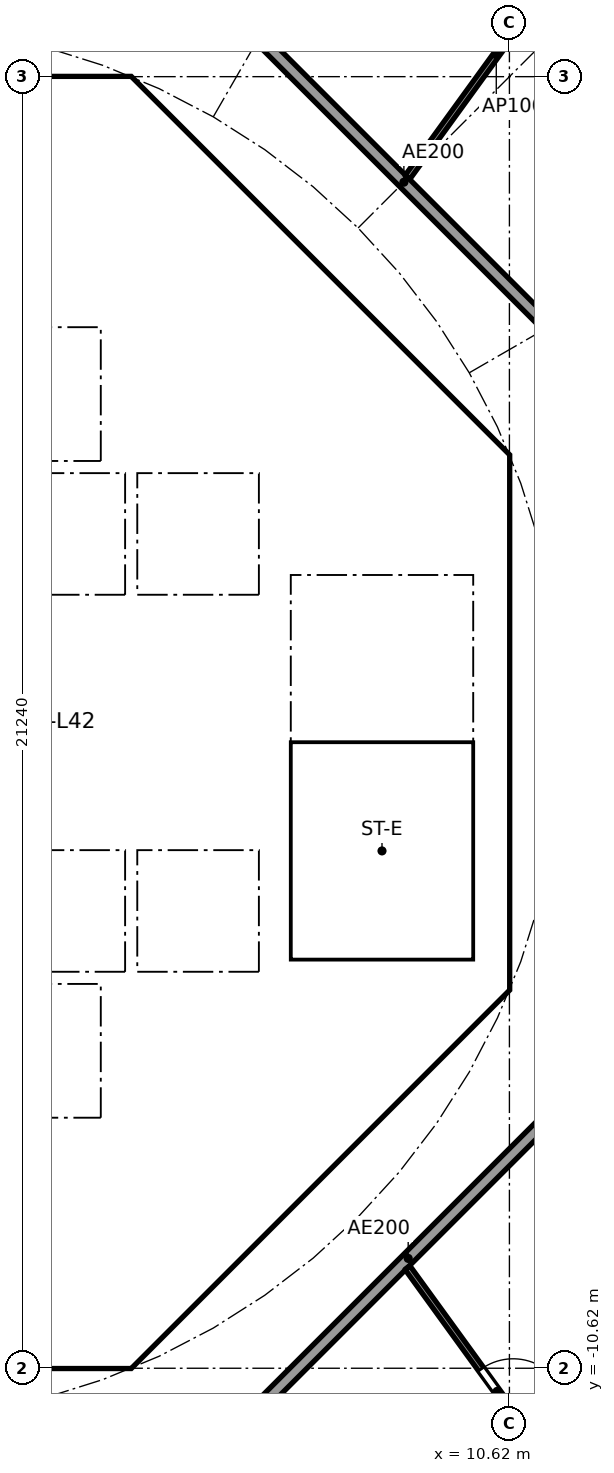
"""IFC4 building model, lengths in metres.
Left out: names, types, materials, properties, quantities, classifications, styles, units other than length and angle.
Written with IfcOpenShell. Run it as: python <this file> out.ifc"""

import sys

from ifc_helpers import new_model, si_unit, direction, frame, frame_2d, origin, place, context, subcontext, project, spatial, polyline, rectangle, outline, extrude, element, fill, save


model = new_model("IFC4")
c1 = context("Model", 3, precision=1e-05, world=origin(), true_north=direction((0.0, 1.0)))
c2 = subcontext(c1, "Body", "Model", "MODEL_VIEW")
j1 = project(units=[si_unit("LENGTHUNIT", "METRE"), si_unit("PLANEANGLEUNIT", "RADIAN")], contexts=[c1])
p1 = place(None, origin())
s1 = spatial("IfcSite", under=j1, at=p1, CompositionType="ELEMENT")
p2 = place(p1, origin())
s2 = spatial("IfcBuilding", under=s1, at=p2, CompositionType="ELEMENT")
p3 = place(p2, frame((0.0, 0.0, 169.6)))
s3 = spatial("IfcBuildingStorey", under=s2, at=p3, CompositionType="ELEMENT", Elevation=169.6)
p4 = place(p3, frame((9.988, 4.613, 0.0), z_axis=(0.0, 0.0, 1.0), x_axis=(-0.707106781187, 0.707106781187, 0.0)))
e1 = element("IfcWall", 1, at=p4, inside=s3, PredefinedType="SHEAR", context=c2, shape_type="SweptSolid", body=[
    extrude(rectangle(XDim=7.602, YDim=0.6, at=frame_2d((3.801, 0.0))), origin(), (0.0, 0.0, 1.0), 3.44),
])
p5 = place(p4, frame((3.201, 0.0, 0.0)))
e2 = element("IfcOpeningElement", 2, at=p5, cuts=e1, PredefinedType="OPENING", context=c2, shape_type="SweptSolid", body=[
    extrude(rectangle(XDim=1.2, YDim=2.1, at=frame_2d((0.6, 1.05))), frame((0.0, 0.31, 0.0), z_axis=(0.0, -1.0, 0.0), x_axis=(1.0, 0.0, 0.0)), (0.0, 0.0, 1.0), 0.62),
])
p6 = place(p3, frame((4.613, -9.988, 0.0), z_axis=(0.0, 0.0, 1.0), x_axis=(0.707106781187, 0.707106781187, 0.0)))
e3 = element("IfcWall", 3, at=p6, inside=s3, PredefinedType="SHEAR", context=c2, shape_type="SweptSolid", body=[
    extrude(rectangle(XDim=7.602, YDim=0.6, at=frame_2d((3.801, 0.0))), origin(), (0.0, 0.0, 1.0), 3.44),
])
p7 = place(p6, frame((3.201, 0.0, 0.0)))
e4 = element("IfcOpeningElement", 4, at=p7, cuts=e3, PredefinedType="OPENING", context=c2, shape_type="SweptSolid", body=[
    extrude(rectangle(XDim=1.2, YDim=2.1, at=frame_2d((0.6, 1.05))), frame((0.0, 0.31, 0.0), z_axis=(0.0, -1.0, 0.0), x_axis=(1.0, 0.0, 0.0)), (0.0, 0.0, 1.0), 0.62),
])
p8 = place(p3, frame((4.0, 4.3, 0.0), z_axis=(0.0, 0.0, 1.0), x_axis=(0.0, 1.0, 0.0)))
e5 = element("IfcWall", 5, at=p8, inside=s3, PredefinedType="SOLIDWALL", context=c2, shape_type="SweptSolid", body=[
    extrude(rectangle(XDim=2.2, YDim=0.2, at=frame_2d((1.1, 0.0))), origin(), (0.0, 0.0, 1.0), 3.44),
])
p9 = place(p8, frame((0.55, 0.0, 0.0)))
e6 = element("IfcOpeningElement", 6, at=p9, cuts=e5, PredefinedType="OPENING", context=c2, shape_type="SweptSolid", body=[
    extrude(rectangle(XDim=1.1, YDim=2.1, at=frame_2d((0.55, 1.05))), frame((0.0, 0.11, 0.0), z_axis=(0.0, -1.0, 0.0), x_axis=(1.0, 0.0, 0.0)), (0.0, 0.0, 1.0), 0.22),
])
p10 = place(p3, frame((-6.7, 2.0, 0.0), z_axis=(0.0, 0.0, 1.0), x_axis=(1.0, 0.0, 0.0)))
e7 = element("IfcWall", 7, at=p10, inside=s3, PredefinedType="SOLIDWALL", context=c2, shape_type="SweptSolid", body=[
    extrude(rectangle(XDim=13.4, YDim=0.2, at=frame_2d((6.7, 0.0))), origin(), (0.0, 0.0, 1.0), 3.44),
])
p11 = place(p10, frame((7.25, 0.0, 0.0)))
e8 = element("IfcOpeningElement", 8, at=p11, cuts=e7, PredefinedType="OPENING", context=c2, shape_type="SweptSolid", body=[
    extrude(rectangle(XDim=1.1, YDim=2.1, at=frame_2d((0.55, 1.05))), frame((0.0, 0.11, 0.0), z_axis=(0.0, -1.0, 0.0), x_axis=(1.0, 0.0, 0.0)), (0.0, 0.0, 1.0), 0.22),
])
p12 = place(p10, frame((9.45, 0.0, 0.0)))
e9 = element("IfcOpeningElement", 9, at=p12, cuts=e7, PredefinedType="OPENING", context=c2, shape_type="SweptSolid", body=[
    extrude(rectangle(XDim=1.1, YDim=2.1, at=frame_2d((0.55, 1.05))), frame((0.0, 0.11, 0.0), z_axis=(0.0, -1.0, 0.0), x_axis=(1.0, 0.0, 0.0)), (0.0, 0.0, 1.0), 0.22),
])
p13 = place(p10, frame((2.95, 0.0, 0.0)))
e10 = element("IfcOpeningElement", 10, at=p13, cuts=e7, PredefinedType="OPENING", context=c2, shape_type="SweptSolid", body=[
    extrude(rectangle(XDim=0.9, YDim=2.1, at=frame_2d((0.45, 1.05))), frame((0.0, 0.11, 0.0), z_axis=(0.0, -1.0, 0.0), x_axis=(1.0, 0.0, 0.0)), (0.0, 0.0, 1.0), 0.22),
])
p14 = place(p3, frame((6.7, 4.0, 0.0), z_axis=(0.0, 0.0, 1.0), x_axis=(1.0, 0.0, 0.0)))
e11 = element("IfcWall", 11, at=p14, inside=s3, PredefinedType="SOLIDWALL", context=c2, shape_type="SweptSolid", body=[
    extrude(rectangle(XDim=3.325, YDim=0.2, at=frame_2d((1.662, 0.0))), origin(), (0.0, 0.0, 1.0), 3.44),
])
p15 = place(p14, frame((1.25, 0.0, 0.0)))
e12 = element("IfcOpeningElement", 12, at=p15, cuts=e11, PredefinedType="OPENING", context=c2, shape_type="SweptSolid", body=[
    extrude(rectangle(XDim=1.1, YDim=2.1, at=frame_2d((0.55, 1.05))), frame((0.0, 0.11, 0.0), z_axis=(0.0, -1.0, 0.0), x_axis=(1.0, 0.0, 0.0)), (0.0, 0.0, 1.0), 0.22),
])
p16 = place(p3, frame((4.0, 7.025, 0.0), z_axis=(0.0, 0.0, 1.0), x_axis=(0.0, 1.0, 0.0)))
e13 = element("IfcWall", 13, at=p16, inside=s3, PredefinedType="SOLIDWALL", context=c2, shape_type="SweptSolid", body=[
    extrude(rectangle(XDim=3.0, YDim=0.2, at=frame_2d((1.5, 0.0))), origin(), (0.0, 0.0, 1.0), 3.44),
])
p17 = place(p16, frame((0.925, 0.0, 0.0)))
e14 = element("IfcOpeningElement", 14, at=p17, cuts=e13, PredefinedType="OPENING", context=c2, shape_type="SweptSolid", body=[
    extrude(rectangle(XDim=1.1, YDim=2.1, at=frame_2d((0.55, 1.05))), frame((0.0, 0.11, 0.0), z_axis=(0.0, -1.0, 0.0), x_axis=(1.0, 0.0, 0.0)), (0.0, 0.0, 1.0), 0.22),
])
p18 = place(p3, frame((4.0, -10.025, 0.0), z_axis=(0.0, 0.0, 1.0), x_axis=(0.0, 1.0, 0.0)))
e15 = element("IfcWall", 15, at=p18, inside=s3, PredefinedType="SOLIDWALL", context=c2, shape_type="SweptSolid", body=[
    extrude(rectangle(XDim=3.0, YDim=0.2, at=frame_2d((1.5, 0.0))), origin(), (0.0, 0.0, 1.0), 3.44),
])
p19 = place(p18, frame((0.975, 0.0, 0.0)))
e16 = element("IfcOpeningElement", 16, at=p19, cuts=e15, PredefinedType="OPENING", context=c2, shape_type="SweptSolid", body=[
    extrude(rectangle(XDim=1.1, YDim=2.1, at=frame_2d((0.55, 1.05))), frame((0.0, 0.11, 0.0), z_axis=(0.0, -1.0, 0.0), x_axis=(1.0, 0.0, 0.0)), (0.0, 0.0, 1.0), 0.22),
])
p20 = place(p3, frame((4.0, -6.5, 0.0), z_axis=(0.0, 0.0, 1.0), x_axis=(0.0, 1.0, 0.0)))
e17 = element("IfcWall", 17, at=p20, inside=s3, PredefinedType="SOLIDWALL", context=c2, shape_type="SweptSolid", body=[
    extrude(rectangle(XDim=2.2, YDim=0.2, at=frame_2d((1.1, 0.0))), origin(), (0.0, 0.0, 1.0), 3.44),
])
p21 = place(p20, frame((0.55, 0.0, 0.0)))
e18 = element("IfcOpeningElement", 18, at=p21, cuts=e17, PredefinedType="OPENING", context=c2, shape_type="SweptSolid", body=[
    extrude(rectangle(XDim=1.1, YDim=2.1, at=frame_2d((0.55, 1.05))), frame((0.0, 0.11, 0.0), z_axis=(0.0, -1.0, 0.0), x_axis=(1.0, 0.0, 0.0)), (0.0, 0.0, 1.0), 0.22),
])
p22 = place(p3, frame((-6.7, -2.0, 0.0), z_axis=(0.0, 0.0, 1.0), x_axis=(1.0, 0.0, 0.0)))
e19 = element("IfcWall", 19, at=p22, inside=s3, PredefinedType="SOLIDWALL", context=c2, shape_type="SweptSolid", body=[
    extrude(rectangle(XDim=13.4, YDim=0.2, at=frame_2d((6.7, 0.0))), origin(), (0.0, 0.0, 1.0), 3.44),
])
p23 = place(p22, frame((5.05, 0.0, 0.0)))
e20 = element("IfcOpeningElement", 20, at=p23, cuts=e19, PredefinedType="OPENING", context=c2, shape_type="SweptSolid", body=[
    extrude(rectangle(XDim=1.1, YDim=2.1, at=frame_2d((0.55, 1.05))), frame((0.0, 0.11, 0.0), z_axis=(0.0, -1.0, 0.0), x_axis=(1.0, 0.0, 0.0)), (0.0, 0.0, 1.0), 0.22),
])
p24 = place(p22, frame((7.25, 0.0, 0.0)))
e21 = element("IfcOpeningElement", 21, at=p24, cuts=e19, PredefinedType="OPENING", context=c2, shape_type="SweptSolid", body=[
    extrude(rectangle(XDim=1.1, YDim=2.1, at=frame_2d((0.55, 1.05))), frame((0.0, 0.11, 0.0), z_axis=(0.0, -1.0, 0.0), x_axis=(1.0, 0.0, 0.0)), (0.0, 0.0, 1.0), 0.22),
])
p25 = place(p22, frame((1.85, 0.0, 0.0)))
e22 = element("IfcOpeningElement", 22, at=p25, cuts=e19, PredefinedType="OPENING", context=c2, shape_type="SweptSolid", body=[
    extrude(rectangle(XDim=0.9, YDim=2.1, at=frame_2d((0.45, 1.05))), frame((0.0, 0.11, 0.0), z_axis=(0.0, -1.0, 0.0), x_axis=(1.0, 0.0, 0.0)), (0.0, 0.0, 1.0), 0.22),
])
p26 = place(p3, origin())
e23 = element("IfcWall", 23, at=p26, inside=s3, PredefinedType="SHEAR", context=c2, shape_type="SweptSolid", body=[
    extrude(outline(polyline([(-4.152, -10.025), (4.152, -10.025), (4.401, -9.776), (4.825, -10.2), (4.401, -10.625), (-4.401, -10.625), (-4.825, -10.2), (-4.401, -9.776), (-4.152, -10.025)])), origin(), (0.0, 0.0, 1.0), 3.44),
])
p27 = place(p3, origin())
e24 = element("IfcWall", 24, at=p27, inside=s3, PredefinedType="SHEAR", context=c2, shape_type="SweptSolid", body=[
    extrude(outline(polyline([(-4.152, 10.025), (-4.401, 9.776), (-4.825, 10.2), (-4.401, 10.625), (4.401, 10.625), (4.825, 10.2), (4.401, 9.776), (4.152, 10.025), (-4.152, 10.025)])), origin(), (0.0, 0.0, 1.0), 3.44),
])
p28 = place(p3, origin())
e25 = element("IfcWall", 25, at=p28, inside=s3, PredefinedType="SHEAR", context=c2, shape_type="SweptSolid", body=[
    extrude(outline(polyline([(9.776, -4.401), (10.025, -4.152), (10.025, -3.801), (10.025, 4.152), (9.776, 4.401), (10.2, 4.825), (10.625, 4.401), (10.625, -4.401), (10.2, -4.825), (9.776, -4.401)])), origin(), (0.0, 0.0, 1.0), 3.44),
])
p29 = place(p3, origin())
e26 = element("IfcWall", 26, at=p29, inside=s3, PredefinedType="SOLIDWALL", context=c2, shape_type="SweptSolid", body=[
    extrude(outline(polyline([(-6.7, -2.1), (-6.5, -2.1), (-6.5, -4.1), (-2.3, -4.1), (-2.3, -2.1), (-2.1, -2.1), (-2.1, -4.1), (-0.1, -4.1), (-0.1, -2.1), (0.1, -2.1), (0.1, -4.1), (2.1, -4.1), (2.1, -2.1), (2.3, -2.1), (2.3, -4.1), (4.3, -4.1), (4.3, -2.1), (4.5, -2.1), (4.5, -4.1), (6.5, -4.1), (6.5, -2.1), (6.7, -2.1), (6.7, -4.3), (-6.7, -4.3), (-6.7, -2.1)])), origin(), (0.0, 0.0, 1.0), 3.44),
])
p30 = place(p3, origin())
e27 = element("IfcWall", 27, at=p30, inside=s3, PredefinedType="SOLIDWALL", context=c2, shape_type="SweptSolid", body=[
    extrude(outline(polyline([(-6.7, 4.3), (6.7, 4.3), (6.7, 2.1), (6.5, 2.1), (6.5, 4.1), (4.5, 4.1), (4.5, 2.1), (4.3, 2.1), (4.3, 4.1), (2.3, 4.1), (2.3, 2.1), (2.1, 2.1), (2.1, 4.1), (0.1, 4.1), (0.1, 2.1), (-0.1, 2.1), (-0.1, 4.1), (-6.5, 4.1), (-6.5, 2.1), (-6.7, 2.1), (-6.7, 4.3)])), origin(), (0.0, 0.0, 1.0), 3.44),
])
p31 = place(p3, origin())
e28 = element("IfcWall", 28, at=p31, inside=s3, PredefinedType="SOLIDWALL", context=c2, shape_type="SweptSolid", body=[
    extrude(outline(polyline([(4.1, -7.025), (-4.1, -7.025), (-4.1, -6.5), (4.1, -6.5), (4.1, -7.025)])), origin(), (0.0, 0.0, 1.0), 3.44),
])
p32 = place(p3, origin())
e29 = element("IfcWall", 29, at=p32, inside=s3, PredefinedType="SOLIDWALL", context=c2, shape_type="SweptSolid", body=[
    extrude(outline(polyline([(4.1, 6.5), (-4.1, 6.5), (-4.1, 7.025), (4.1, 7.025), (4.1, 6.5)])), origin(), (0.0, 0.0, 1.0), 3.44),
])
p33 = place(p3, origin())
e30 = element("IfcWall", 30, at=p33, inside=s3, PredefinedType="SOLIDWALL", context=c2, shape_type="SweptSolid", body=[
    extrude(outline(polyline([(7.025, -3.9), (6.7, -3.9), (6.7, 3.9), (7.025, 3.9), (7.025, -3.9)])), origin(), (0.0, 0.0, 1.0), 3.44),
])
p34 = place(p3, origin())
e31 = element("IfcWall", 31, at=p34, inside=s3, PredefinedType="SOLIDWALL", context=c2, shape_type="SweptSolid", body=[
    extrude(outline(polyline([(10.025, -4.1), (6.7, -4.1), (6.7, -3.9), (10.025, -3.9), (10.025, -4.1)])), origin(), (0.0, 0.0, 1.0), 3.44),
])
p35 = place(p3, frame((12.635, 5.134, 0.0), z_axis=(0.0, 0.0, 1.0), x_axis=(-0.707106781187, 0.707106781187, 0.0)))
e32 = element("IfcWall", 32, at=p35, inside=s3, PredefinedType="PARTITIONING", context=c2, shape_type="SweptSolid", body=[
    extrude(rectangle(XDim=10.609, YDim=0.2, at=frame_2d((5.305, 0.0))), origin(), (0.0, 0.0, 1.0), 3.44),
])
p36 = place(p3, frame((5.275, -12.494, 0.0), z_axis=(0.0, 0.0, 1.0), x_axis=(0.707106781187, 0.707106781187, 0.0)))
e33 = element("IfcWall", 33, at=p36, inside=s3, PredefinedType="PARTITIONING", context=c2, shape_type="SweptSolid", body=[
    extrude(rectangle(XDim=10.409, YDim=0.2, at=frame_2d((5.205, 0.0))), origin(), (0.0, 0.0, 1.0), 3.44),
])
p37 = place(p3, frame((8.943, 8.966, 0.0), z_axis=(0.0, 0.0, 1.0), x_axis=(0.587187896734, 0.809450661825, 0.0)))
e34 = element("IfcWall", 34, at=p37, inside=s3, PredefinedType="PARTITIONING", context=c2, shape_type="SweptSolid", body=[
    extrude(rectangle(XDim=4.975, YDim=0.1, at=frame_2d((2.487, 0.0))), origin(), (0.0, 0.0, 1.0), 2.756),
])
p38 = place(p3, frame((8.943, -8.966, 0.0), z_axis=(0.0, 0.0, 1.0), x_axis=(0.586803608919, -0.809729290912, 0.0)))
e35 = element("IfcWall", 35, at=p38, inside=s3, PredefinedType="PARTITIONING", context=c2, shape_type="SweptSolid", body=[
    extrude(rectangle(XDim=17.179, YDim=0.1, at=frame_2d((8.589, 0.0))), origin(), (0.0, 0.0, 1.0), 2.756),
])
p39 = place(p38, frame((2.062, 0.0, 0.0)))
e36 = element("IfcOpeningElement", 36, at=p39, cuts=e35, PredefinedType="OPENING", context=c2, shape_type="SweptSolid", body=[
    extrude(rectangle(XDim=0.9, YDim=2.1, at=frame_2d((0.45, 1.05))), frame((0.0, 0.06, 0.0), z_axis=(0.0, -1.0, 0.0), x_axis=(1.0, 0.0, 0.0)), (0.0, 0.0, 1.0), 0.12),
])
p40 = place(p38, frame((7.308, 0.0, 0.0)))
e37 = element("IfcOpeningElement", 37, at=p40, cuts=e35, PredefinedType="OPENING", context=c2, shape_type="SweptSolid", body=[
    extrude(rectangle(XDim=0.9, YDim=2.1, at=frame_2d((0.45, 1.05))), frame((0.0, 0.06, 0.0), z_axis=(0.0, -1.0, 0.0), x_axis=(1.0, 0.0, 0.0)), (0.0, 0.0, 1.0), 0.12),
])
p41 = place(p12, origin())
e38 = element("IfcDoor", 38, at=p41, inside=s3, OperationType="DOUBLE_DOOR_SLIDING", PredefinedType="DOOR", context=c2, shape_type="SweptSolid", body=[
    extrude(rectangle(XDim=1.1, YDim=2.1, at=frame_2d((0.55, 1.05))), frame((0.0, 0.025, 0.0), z_axis=(0.0, -1.0, 0.0), x_axis=(1.0, 0.0, 0.0)), (0.0, 0.0, 1.0), 0.05),
])
fill(e9, e38)
p42 = place(p9, origin())
e39 = element("IfcDoor", 39, at=p42, inside=s3, OperationType="DOUBLE_DOOR_SLIDING", PredefinedType="DOOR", context=c2, shape_type="SweptSolid", body=[
    extrude(rectangle(XDim=1.1, YDim=2.1, at=frame_2d((0.55, 1.05))), frame((0.0, 0.025, 0.0), z_axis=(0.0, -1.0, 0.0), x_axis=(1.0, 0.0, 0.0)), (0.0, 0.0, 1.0), 0.05),
])
fill(e6, e39)
p43 = place(p21, origin())
e40 = element("IfcDoor", 40, at=p43, inside=s3, OperationType="DOUBLE_DOOR_SLIDING", PredefinedType="DOOR", context=c2, shape_type="SweptSolid", body=[
    extrude(rectangle(XDim=1.1, YDim=2.1, at=frame_2d((0.55, 1.05))), frame((0.0, 0.025, 0.0), z_axis=(0.0, -1.0, 0.0), x_axis=(1.0, 0.0, 0.0)), (0.0, 0.0, 1.0), 0.05),
])
fill(e18, e40)
p44 = place(p15, frame((1.1, 0.0, 0.0), x_axis=(-1.0, 0.0, 0.0)))
e41 = element("IfcDoor", 41, at=p44, inside=s3, OperationType="SINGLE_SWING_RIGHT", PredefinedType="DOOR", context=c2, shape_type="SweptSolid", body=[
    extrude(rectangle(XDim=1.1, YDim=2.1, at=frame_2d((0.55, 1.05))), frame((0.0, 0.025, 0.0), z_axis=(0.0, -1.0, 0.0), x_axis=(1.0, 0.0, 0.0)), (0.0, 0.0, 1.0), 0.05),
])
fill(e12, e41)
p45 = place(p17, origin())
e42 = element("IfcDoor", 42, at=p45, inside=s3, OperationType="SINGLE_SWING_LEFT", PredefinedType="DOOR", context=c2, shape_type="SweptSolid", body=[
    extrude(rectangle(XDim=1.1, YDim=2.1, at=frame_2d((0.55, 1.05))), frame((0.0, 0.025, 0.0), z_axis=(0.0, -1.0, 0.0), x_axis=(1.0, 0.0, 0.0)), (0.0, 0.0, 1.0), 0.05),
])
fill(e14, e42)
p46 = place(p19, origin())
e43 = element("IfcDoor", 43, at=p46, inside=s3, OperationType="SINGLE_SWING_RIGHT", PredefinedType="DOOR", context=c2, shape_type="SweptSolid", body=[
    extrude(rectangle(XDim=1.1, YDim=2.1, at=frame_2d((0.55, 1.05))), frame((0.0, 0.025, 0.0), z_axis=(0.0, -1.0, 0.0), x_axis=(1.0, 0.0, 0.0)), (0.0, 0.0, 1.0), 0.05),
])
fill(e16, e43)
p47 = place(p5, origin())
e44 = element("IfcDoor", 44, at=p47, inside=s3, OperationType="SINGLE_SWING_RIGHT", PredefinedType="DOOR", context=c2, shape_type="SweptSolid", body=[
    extrude(rectangle(XDim=1.2, YDim=2.1, at=frame_2d((0.6, 1.05))), frame((0.0, 0.025, 0.0), z_axis=(0.0, -1.0, 0.0), x_axis=(1.0, 0.0, 0.0)), (0.0, 0.0, 1.0), 0.05),
])
fill(e2, e44)
p48 = place(p7, origin())
e45 = element("IfcDoor", 45, at=p48, inside=s3, OperationType="SINGLE_SWING_RIGHT", PredefinedType="DOOR", context=c2, shape_type="SweptSolid", body=[
    extrude(rectangle(XDim=1.2, YDim=2.1, at=frame_2d((0.6, 1.05))), frame((0.0, 0.025, 0.0), z_axis=(0.0, -1.0, 0.0), x_axis=(1.0, 0.0, 0.0)), (0.0, 0.0, 1.0), 0.05),
])
fill(e4, e45)
p49 = place(p39, origin())
e46 = element("IfcDoor", 46, at=p49, inside=s3, OperationType="SINGLE_SWING_RIGHT", PredefinedType="DOOR", context=c2, shape_type="SweptSolid", body=[
    extrude(rectangle(XDim=0.9, YDim=2.1, at=frame_2d((0.45, 1.05))), frame((0.0, 0.025, 0.0), z_axis=(0.0, -1.0, 0.0), x_axis=(1.0, 0.0, 0.0)), (0.0, 0.0, 1.0), 0.05),
])
fill(e36, e46)
save(model, sys.argv[1])
